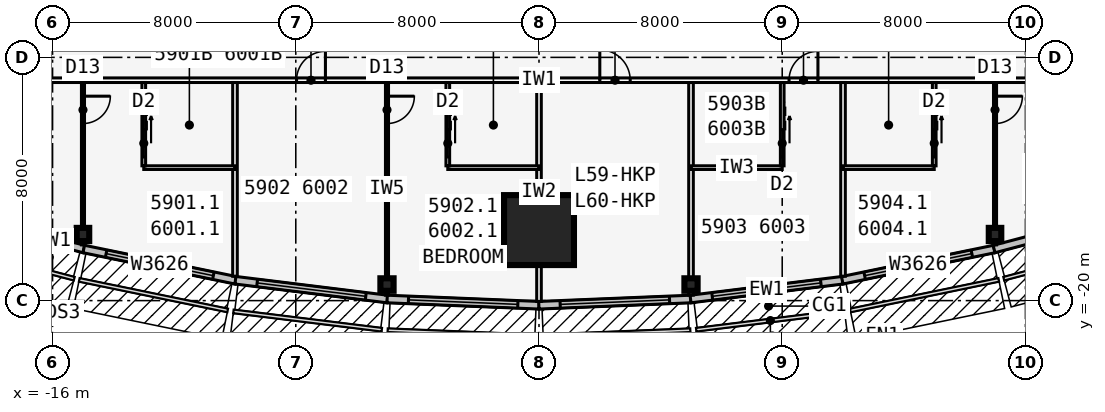
"""IFC4 building model, lengths in metres.
Left out: names, types, materials, properties, quantities, classifications, styles, units other than length and angle.
Written with IfcOpenShell. Run it as: python <this file> out.ifc"""

import sys

from ifc_helpers import new_model, si_unit, direction, frame, frame_2d, origin, origin_2d, place, context, subcontext, project, spatial, rectangle, i_section, extrude, element, fill, save


model = new_model("IFC4")
c1 = context("Model", 3, precision=1e-05, world=origin(), true_north=direction((0.0, 1.0)))
c2 = subcontext(c1, "Body", "Model", "MODEL_VIEW")
j1 = project(units=[si_unit("LENGTHUNIT", "METRE"), si_unit("PLANEANGLEUNIT", "RADIAN")], contexts=[c1])
p1 = place(None, origin())
s1 = spatial("IfcSite", under=j1, at=p1, CompositionType="ELEMENT")
p2 = place(p1, origin())
s2 = spatial("IfcBuilding", under=s1, at=p2, CompositionType="ELEMENT")
p3 = place(p2, frame((0.0, 0.0, 222.5)))
s3 = spatial("IfcBuildingStorey", under=s2, at=p3, CompositionType="ELEMENT", Elevation=222.5)
for number, where, z_axis, x_axis in (
    (1, (-15.0, -17.825, 0.0), (0.0, 0.0, 1.0), (1.0, 0.0, 0.0)),
    (2, (-5.0, -19.472, 0.0), (0.0, 0.0, 1.0), (0.0, -1.0, 0.0)),
    (3, (5.0, -19.472, 0.0), (0.0, 0.0, 1.0), (0.0, -1.0, 0.0)),
    (4, (15.0, -17.825, 0.0), (0.0, 0.0, 1.0), (1.0, 0.0, 0.0)),
):
    element("IfcColumn", number, at=place(p3, frame(where, z_axis=z_axis, x_axis=x_axis)), inside=s3, PredefinedType="COLUMN", context=c2, shape_type="SweptSolid", body=[
        extrude(i_section(OverallWidth=0.411, OverallDepth=0.434, WebThickness=0.036, FlangeThickness=0.057, at=origin_2d()), origin(), (0.0, 0.0, 1.0), 3.6),
    ])
p4 = place(p3, frame((0.0, -17.68, 0.0), z_axis=(0.0, 0.0, 1.0), x_axis=(0.0, -1.0, 0.0)))
e5 = element("IfcColumn", 5, at=p4, inside=s3, PredefinedType="COLUMN", context=c2, shape_type="SweptSolid", body=[
    extrude(rectangle(XDim=2.3, YDim=2.3, at=origin_2d()), origin(), (0.0, 0.0, 1.0), 3.6),
])
p5 = place(p3, frame((-16.968, -17.777, 0.0), z_axis=(0.0, 0.0, 1.0), x_axis=(0.967010286052, -0.254737328772, 0.0)))
e6 = element("IfcWall", 6, at=p5, inside=s3, PredefinedType="STANDARD", context=c2, shape_type="SweptSolid", body=[
    extrude(rectangle(XDim=2.068, YDim=0.25, at=frame_2d((1.034, 0.0))), origin(), (0.0, 0.0, 1.0), 3.435),
])
p6 = place(p3, frame((-14.975, -18.302, 0.0), z_axis=(0.0, 0.0, 1.0), x_axis=(0.979461488189, -0.201631329795, 0.0)))
e7 = element("IfcWall", 7, at=p6, inside=s3, PredefinedType="STANDARD", context=c2, shape_type="SweptSolid", body=[
    extrude(rectangle(XDim=5.105, YDim=0.25, at=frame_2d((2.552, 0.0))), origin(), (0.0, 0.0, 1.0), 3.435),
])
p7 = place(p6, frame((0.752, 0.0, 0.45)))
e8 = element("IfcOpeningElement", 8, at=p7, cuts=e7, PredefinedType="OPENING", context=c2, shape_type="SweptSolid", body=[
    extrude(rectangle(XDim=3.6, YDim=2.6, at=frame_2d((1.8, 1.3))), frame((0.0, 0.135, 0.0), z_axis=(0.0, -1.0, 0.0), x_axis=(1.0, 0.0, 0.0)), (0.0, 0.0, 1.0), 0.27),
])
p8 = place(p3, frame((-9.985, -19.33, 0.0), z_axis=(0.0, 0.0, 1.0), x_axis=(0.992449874964, -0.12265090984, 0.0)))
e9 = element("IfcWall", 9, at=p8, inside=s3, PredefinedType="STANDARD", context=c2, shape_type="SweptSolid", body=[
    extrude(rectangle(XDim=5.038, YDim=0.25, at=frame_2d((2.519, 0.0))), origin(), (0.0, 0.0, 1.0), 3.435),
])
p9 = place(p8, frame((0.719, 0.0, 0.45)))
e10 = element("IfcOpeningElement", 10, at=p9, cuts=e9, PredefinedType="OPENING", context=c2, shape_type="SweptSolid", body=[
    extrude(rectangle(XDim=3.6, YDim=2.6, at=frame_2d((1.8, 1.3))), frame((0.0, 0.135, 0.0), z_axis=(0.0, -1.0, 0.0), x_axis=(1.0, 0.0, 0.0)), (0.0, 0.0, 1.0), 0.27),
])
p10 = place(p3, frame((-4.995, -19.947, 0.0), z_axis=(0.0, 0.0, 1.0), x_axis=(0.999151909423, -0.041175986892, 0.0)))
e11 = element("IfcWall", 11, at=p10, inside=s3, PredefinedType="STANDARD", context=c2, shape_type="SweptSolid", body=[
    extrude(rectangle(XDim=5.004, YDim=0.25, at=frame_2d((2.502, 0.0))), origin(), (0.0, 0.0, 1.0), 3.435),
])
p11 = place(p10, frame((0.702, 0.0, 0.45)))
e12 = element("IfcOpeningElement", 12, at=p11, cuts=e11, PredefinedType="OPENING", context=c2, shape_type="SweptSolid", body=[
    extrude(rectangle(XDim=3.6, YDim=2.6, at=frame_2d((1.8, 1.3))), frame((0.0, 0.135, 0.0), z_axis=(0.0, -1.0, 0.0), x_axis=(1.0, 0.0, 0.0)), (0.0, 0.0, 1.0), 0.27),
])
p12 = place(p3, frame((-0.005, -20.153, 0.0), z_axis=(0.0, 0.0, 1.0), x_axis=(0.999151909423, 0.041175986892, 0.0)))
e13 = element("IfcWall", 13, at=p12, inside=s3, PredefinedType="STANDARD", context=c2, shape_type="SweptSolid", body=[
    extrude(rectangle(XDim=5.004, YDim=0.25, at=frame_2d((2.502, 0.0))), origin(), (0.0, 0.0, 1.0), 3.435),
])
p13 = place(p12, frame((0.702, 0.0, 0.45)))
e14 = element("IfcOpeningElement", 14, at=p13, cuts=e13, PredefinedType="OPENING", context=c2, shape_type="SweptSolid", body=[
    extrude(rectangle(XDim=3.6, YDim=2.6, at=frame_2d((1.8, 1.3))), frame((0.0, 0.135, 0.0), z_axis=(0.0, -1.0, 0.0), x_axis=(1.0, 0.0, 0.0)), (0.0, 0.0, 1.0), 0.27),
])
p14 = place(p3, frame((4.985, -19.948, 0.0), z_axis=(0.0, 0.0, 1.0), x_axis=(0.992449874964, 0.12265090984, 0.0)))
e15 = element("IfcWall", 15, at=p14, inside=s3, PredefinedType="STANDARD", context=c2, shape_type="SweptSolid", body=[
    extrude(rectangle(XDim=5.038, YDim=0.25, at=frame_2d((2.519, 0.0))), origin(), (0.0, 0.0, 1.0), 3.435),
])
p15 = place(p14, frame((0.719, 0.0, 0.45)))
e16 = element("IfcOpeningElement", 16, at=p15, cuts=e15, PredefinedType="OPENING", context=c2, shape_type="SweptSolid", body=[
    extrude(rectangle(XDim=3.6, YDim=2.6, at=frame_2d((1.8, 1.3))), frame((0.0, 0.135, 0.0), z_axis=(0.0, -1.0, 0.0), x_axis=(1.0, 0.0, 0.0)), (0.0, 0.0, 1.0), 0.27),
])
p16 = place(p3, frame((9.975, -19.332, 0.0), z_axis=(0.0, 0.0, 1.0), x_axis=(0.979461488189, 0.201631329795, 0.0)))
e17 = element("IfcWall", 17, at=p16, inside=s3, PredefinedType="STANDARD", context=c2, shape_type="SweptSolid", body=[
    extrude(rectangle(XDim=5.105, YDim=0.25, at=frame_2d((2.552, 0.0))), origin(), (0.0, 0.0, 1.0), 3.435),
])
p17 = place(p16, frame((0.752, 0.0, 0.45)))
e18 = element("IfcOpeningElement", 18, at=p17, cuts=e17, PredefinedType="OPENING", context=c2, shape_type="SweptSolid", body=[
    extrude(rectangle(XDim=3.6, YDim=2.6, at=frame_2d((1.8, 1.3))), frame((0.0, 0.135, 0.0), z_axis=(0.0, -1.0, 0.0), x_axis=(1.0, 0.0, 0.0)), (0.0, 0.0, 1.0), 0.27),
])
p18 = place(p3, frame((14.968, -18.304, 0.0), z_axis=(0.0, 0.0, 1.0), x_axis=(0.967010286052, 0.254737328772, 0.0)))
e19 = element("IfcWall", 19, at=p18, inside=s3, PredefinedType="STANDARD", context=c2, shape_type="SweptSolid", body=[
    extrude(rectangle(XDim=2.068, YDim=0.25, at=frame_2d((1.034, 0.0))), origin(), (0.0, 0.0, 1.0), 3.435),
])
p19 = place(p3, frame((-21.236, -12.751, 0.0), z_axis=(0.0, 0.0, 1.0), x_axis=(1.0, 0.0, 0.0)))
e20 = element("IfcWall", 20, at=p19, inside=s3, PredefinedType="PARTITIONING", context=c2, shape_type="SweptSolid", body=[
    extrude(rectangle(XDim=42.472, YDim=0.15, at=frame_2d((21.236, 0.0))), origin(), (0.0, 0.0, 1.0), 3.435),
])
p20 = place(p19, frame((2.444, 0.0, 0.0)))
e21 = element("IfcOpeningElement", 21, at=p20, cuts=e20, PredefinedType="OPENING", context=c2, shape_type="SweptSolid", body=[
    extrude(rectangle(XDim=0.95, YDim=2.13, at=frame_2d((0.475, 1.065))), frame((0.0, 0.085, 0.0), z_axis=(0.0, -1.0, 0.0), x_axis=(1.0, 0.0, 0.0)), (0.0, 0.0, 1.0), 0.17),
])
p21 = place(p19, frame((13.261, 0.0, 0.0)))
e22 = element("IfcOpeningElement", 22, at=p21, cuts=e20, PredefinedType="OPENING", context=c2, shape_type="SweptSolid", body=[
    extrude(rectangle(XDim=0.95, YDim=2.13, at=frame_2d((0.475, 1.065))), frame((0.0, 0.085, 0.0), z_axis=(0.0, -1.0, 0.0), x_axis=(1.0, 0.0, 0.0)), (0.0, 0.0, 1.0), 0.17),
])
p22 = place(p19, frame((23.236, 0.0, 0.0)))
e23 = element("IfcOpeningElement", 23, at=p22, cuts=e20, PredefinedType="OPENING", context=c2, shape_type="SweptSolid", body=[
    extrude(rectangle(XDim=1.0, YDim=2.13, at=frame_2d((0.5, 1.065))), frame((0.0, 0.085, 0.0), z_axis=(0.0, -1.0, 0.0), x_axis=(1.0, 0.0, 0.0)), (0.0, 0.0, 1.0), 0.17),
])
p23 = place(p19, frame((29.461, 0.0, 0.0)))
e24 = element("IfcOpeningElement", 24, at=p23, cuts=e20, PredefinedType="OPENING", context=c2, shape_type="SweptSolid", body=[
    extrude(rectangle(XDim=0.95, YDim=2.13, at=frame_2d((0.475, 1.065))), frame((0.0, 0.085, 0.0), z_axis=(0.0, -1.0, 0.0), x_axis=(1.0, 0.0, 0.0)), (0.0, 0.0, 1.0), 0.17),
])
p24 = place(p19, frame((39.077, 0.0, 0.0)))
e25 = element("IfcOpeningElement", 25, at=p24, cuts=e20, PredefinedType="OPENING", context=c2, shape_type="SweptSolid", body=[
    extrude(rectangle(XDim=0.95, YDim=2.13, at=frame_2d((0.475, 1.065))), frame((0.0, 0.085, 0.0), z_axis=(0.0, -1.0, 0.0), x_axis=(1.0, 0.0, 0.0)), (0.0, 0.0, 1.0), 0.17),
])
p25 = place(p3, frame((-15.0, -12.826, 0.0), z_axis=(0.0, 0.0, 1.0), x_axis=(0.0, -1.0, 0.0)))
e26 = element("IfcWall", 26, at=p25, inside=s3, PredefinedType="PARTITIONING", context=c2, shape_type="SweptSolid", body=[
    extrude(rectangle(XDim=5.34, YDim=0.1, at=frame_2d((2.67, 0.0))), origin(), (0.0, 0.0, 1.0), 2.589),
])
p26 = place(p25, frame((0.45, 0.0, 0.0)))
e27 = element("IfcOpeningElement", 27, at=p26, cuts=e26, PredefinedType="OPENING", context=c2, shape_type="SweptSolid", body=[
    extrude(rectangle(XDim=0.9, YDim=2.13, at=frame_2d((0.45, 1.065))), frame((0.0, 0.06, 0.0), z_axis=(0.0, -1.0, 0.0), x_axis=(1.0, 0.0, 0.0)), (0.0, 0.0, 1.0), 0.12),
])
p27 = place(p3, frame((-10.0, -12.826, 0.0), z_axis=(0.0, 0.0, 1.0), x_axis=(0.0, -1.0, 0.0)))
e28 = element("IfcWall", 28, at=p27, inside=s3, PredefinedType="PARTITIONING", context=c2, shape_type="SweptSolid", body=[
    extrude(rectangle(XDim=6.373, YDim=0.15, at=frame_2d((3.187, 0.0))), origin(), (0.0, 0.0, 1.0), 2.589),
])
p28 = place(p3, frame((-5.0, -12.826, 0.0), z_axis=(0.0, 0.0, 1.0), x_axis=(0.0, -1.0, 0.0)))
e29 = element("IfcWall", 29, at=p28, inside=s3, PredefinedType="PARTITIONING", context=c2, shape_type="SweptSolid", body=[
    extrude(rectangle(XDim=6.994, YDim=0.1, at=frame_2d((3.497, 0.0))), origin(), (0.0, 0.0, 1.0), 2.589),
])
p29 = place(p28, frame((0.45, 0.0, 0.0)))
e30 = element("IfcOpeningElement", 30, at=p29, cuts=e29, PredefinedType="OPENING", context=c2, shape_type="SweptSolid", body=[
    extrude(rectangle(XDim=0.9, YDim=2.13, at=frame_2d((0.45, 1.065))), frame((0.0, 0.06, 0.0), z_axis=(0.0, -1.0, 0.0), x_axis=(1.0, 0.0, 0.0)), (0.0, 0.0, 1.0), 0.12),
])
p30 = place(p3, frame((0.0, -12.826, 0.0), z_axis=(0.0, 0.0, 1.0), x_axis=(0.0, -1.0, 0.0)))
e31 = element("IfcWall", 31, at=p30, inside=s3, PredefinedType="PARTITIONING", context=c2, shape_type="SweptSolid", body=[
    extrude(rectangle(XDim=7.201, YDim=0.15, at=frame_2d((3.601, 0.0))), origin(), (0.0, 0.0, 1.0), 2.589),
])
p31 = place(p3, frame((5.0, -12.826, 0.0), z_axis=(0.0, 0.0, 1.0), x_axis=(0.0, -1.0, 0.0)))
e32 = element("IfcWall", 32, at=p31, inside=s3, PredefinedType="PARTITIONING", context=c2, shape_type="SweptSolid", body=[
    extrude(rectangle(XDim=6.994, YDim=0.15, at=frame_2d((3.497, 0.0))), origin(), (0.0, 0.0, 1.0), 2.589),
])
p32 = place(p3, frame((10.0, -12.826, 0.0), z_axis=(0.0, 0.0, 1.0), x_axis=(0.0, -1.0, 0.0)))
e33 = element("IfcWall", 33, at=p32, inside=s3, PredefinedType="PARTITIONING", context=c2, shape_type="SweptSolid", body=[
    extrude(rectangle(XDim=6.373, YDim=0.15, at=frame_2d((3.187, 0.0))), origin(), (0.0, 0.0, 1.0), 2.589),
])
p33 = place(p3, frame((15.0, -12.826, 0.0), z_axis=(0.0, 0.0, 1.0), x_axis=(0.0, -1.0, 0.0)))
e34 = element("IfcWall", 34, at=p33, inside=s3, PredefinedType="PARTITIONING", context=c2, shape_type="SweptSolid", body=[
    extrude(rectangle(XDim=5.34, YDim=0.1, at=frame_2d((2.67, 0.0))), origin(), (0.0, 0.0, 1.0), 2.589),
])
p34 = place(p33, frame((0.45, 0.0, 0.0)))
e35 = element("IfcOpeningElement", 35, at=p34, cuts=e34, PredefinedType="OPENING", context=c2, shape_type="SweptSolid", body=[
    extrude(rectangle(XDim=0.9, YDim=2.13, at=frame_2d((0.45, 1.065))), frame((0.0, 0.06, 0.0), z_axis=(0.0, -1.0, 0.0), x_axis=(1.0, 0.0, 0.0)), (0.0, 0.0, 1.0), 0.12),
])
p35 = place(p3, frame((-13.0, -15.626, 0.0), z_axis=(0.0, 0.0, 1.0), x_axis=(1.0, 0.0, 0.0)))
e36 = element("IfcWall", 36, at=p35, inside=s3, PredefinedType="PLUMBINGWALL", context=c2, shape_type="SweptSolid", body=[
    extrude(rectangle(XDim=3.0, YDim=0.12, at=frame_2d((1.5, 0.0))), origin(), (0.0, 0.0, 1.0), 3.435),
])
p36 = place(p3, frame((-13.0, -12.826, 0.0), z_axis=(0.0, 0.0, 1.0), x_axis=(0.0, -1.0, 0.0)))
e37 = element("IfcWall", 37, at=p36, inside=s3, PredefinedType="PLUMBINGWALL", context=c2, shape_type="SweptSolid", body=[
    extrude(rectangle(XDim=2.74, YDim=0.12, at=frame_2d((1.37, 0.0))), origin(), (0.0, 0.0, 1.0), 3.435),
])
p37 = place(p36, frame((1.55, 0.0, 0.0)))
e38 = element("IfcOpeningElement", 38, at=p37, cuts=e37, PredefinedType="OPENING", context=c2, shape_type="SweptSolid", body=[
    extrude(rectangle(XDim=0.9, YDim=2.13, at=frame_2d((0.45, 1.065))), frame((0.0, 0.07, 0.0), z_axis=(0.0, -1.0, 0.0), x_axis=(1.0, 0.0, 0.0)), (0.0, 0.0, 1.0), 0.14),
])
p38 = place(p3, frame((-3.0, -15.626, 0.0), z_axis=(0.0, 0.0, 1.0), x_axis=(1.0, 0.0, 0.0)))
e39 = element("IfcWall", 39, at=p38, inside=s3, PredefinedType="PLUMBINGWALL", context=c2, shape_type="SweptSolid", body=[
    extrude(rectangle(XDim=3.0, YDim=0.12, at=frame_2d((1.5, 0.0))), origin(), (0.0, 0.0, 1.0), 3.435),
])
p39 = place(p3, frame((-3.0, -12.826, 0.0), z_axis=(0.0, 0.0, 1.0), x_axis=(0.0, -1.0, 0.0)))
e40 = element("IfcWall", 40, at=p39, inside=s3, PredefinedType="PLUMBINGWALL", context=c2, shape_type="SweptSolid", body=[
    extrude(rectangle(XDim=2.74, YDim=0.12, at=frame_2d((1.37, 0.0))), origin(), (0.0, 0.0, 1.0), 3.435),
])
p40 = place(p39, frame((1.55, 0.0, 0.0)))
e41 = element("IfcOpeningElement", 41, at=p40, cuts=e40, PredefinedType="OPENING", context=c2, shape_type="SweptSolid", body=[
    extrude(rectangle(XDim=0.9, YDim=2.13, at=frame_2d((0.45, 1.065))), frame((0.0, 0.07, 0.0), z_axis=(0.0, -1.0, 0.0), x_axis=(1.0, 0.0, 0.0)), (0.0, 0.0, 1.0), 0.14),
])
p41 = place(p3, frame((5.0, -15.626, 0.0), z_axis=(0.0, 0.0, 1.0), x_axis=(1.0, 0.0, 0.0)))
e42 = element("IfcWall", 42, at=p41, inside=s3, PredefinedType="PLUMBINGWALL", context=c2, shape_type="SweptSolid", body=[
    extrude(rectangle(XDim=3.0, YDim=0.12, at=frame_2d((1.5, 0.0))), origin(), (0.0, 0.0, 1.0), 3.435),
])
p42 = place(p3, frame((8.0, -12.826, 0.0), z_axis=(0.0, 0.0, 1.0), x_axis=(0.0, -1.0, 0.0)))
e43 = element("IfcWall", 43, at=p42, inside=s3, PredefinedType="PLUMBINGWALL", context=c2, shape_type="SweptSolid", body=[
    extrude(rectangle(XDim=2.74, YDim=0.12, at=frame_2d((1.37, 0.0))), origin(), (0.0, 0.0, 1.0), 3.435),
])
p43 = place(p42, frame((1.55, 0.0, 0.0)))
e44 = element("IfcOpeningElement", 44, at=p43, cuts=e43, PredefinedType="OPENING", context=c2, shape_type="SweptSolid", body=[
    extrude(rectangle(XDim=0.9, YDim=2.13, at=frame_2d((0.45, 1.065))), frame((0.0, 0.07, 0.0), z_axis=(0.0, -1.0, 0.0), x_axis=(1.0, 0.0, 0.0)), (0.0, 0.0, 1.0), 0.14),
])
p44 = place(p3, frame((10.0, -15.626, 0.0), z_axis=(0.0, 0.0, 1.0), x_axis=(1.0, 0.0, 0.0)))
e45 = element("IfcWall", 45, at=p44, inside=s3, PredefinedType="PLUMBINGWALL", context=c2, shape_type="SweptSolid", body=[
    extrude(rectangle(XDim=3.0, YDim=0.12, at=frame_2d((1.5, 0.0))), origin(), (0.0, 0.0, 1.0), 3.435),
])
p45 = place(p3, frame((13.0, -12.826, 0.0), z_axis=(0.0, 0.0, 1.0), x_axis=(0.0, -1.0, 0.0)))
e46 = element("IfcWall", 46, at=p45, inside=s3, PredefinedType="PLUMBINGWALL", context=c2, shape_type="SweptSolid", body=[
    extrude(rectangle(XDim=2.74, YDim=0.12, at=frame_2d((1.37, 0.0))), origin(), (0.0, 0.0, 1.0), 3.435),
])
p46 = place(p45, frame((1.55, 0.0, 0.0)))
e47 = element("IfcOpeningElement", 47, at=p46, cuts=e46, PredefinedType="OPENING", context=c2, shape_type="SweptSolid", body=[
    extrude(rectangle(XDim=0.9, YDim=2.13, at=frame_2d((0.45, 1.065))), frame((0.0, 0.07, 0.0), z_axis=(0.0, -1.0, 0.0), x_axis=(1.0, 0.0, 0.0)), (0.0, 0.0, 1.0), 0.14),
])
p47 = place(p7, origin())
e48 = element("IfcWindow", 48, at=p47, inside=s3, PartitioningType="SINGLE_PANEL", PredefinedType="WINDOW", context=c2, shape_type="SweptSolid", body=[
    extrude(rectangle(XDim=3.6, YDim=2.6, at=frame_2d((1.8, 1.3))), frame((0.0, 0.03, 0.0), z_axis=(0.0, -1.0, 0.0), x_axis=(1.0, 0.0, 0.0)), (0.0, 0.0, 1.0), 0.06),
])
fill(e8, e48)
p48 = place(p9, origin())
e49 = element("IfcWindow", 49, at=p48, inside=s3, PartitioningType="SINGLE_PANEL", PredefinedType="WINDOW", context=c2, shape_type="SweptSolid", body=[
    extrude(rectangle(XDim=3.6, YDim=2.6, at=frame_2d((1.8, 1.3))), frame((0.0, 0.03, 0.0), z_axis=(0.0, -1.0, 0.0), x_axis=(1.0, 0.0, 0.0)), (0.0, 0.0, 1.0), 0.06),
])
fill(e10, e49)
p49 = place(p11, origin())
e50 = element("IfcWindow", 50, at=p49, inside=s3, PartitioningType="SINGLE_PANEL", PredefinedType="WINDOW", context=c2, shape_type="SweptSolid", body=[
    extrude(rectangle(XDim=3.6, YDim=2.6, at=frame_2d((1.8, 1.3))), frame((0.0, 0.03, 0.0), z_axis=(0.0, -1.0, 0.0), x_axis=(1.0, 0.0, 0.0)), (0.0, 0.0, 1.0), 0.06),
])
fill(e12, e50)
p50 = place(p13, origin())
e51 = element("IfcWindow", 51, at=p50, inside=s3, PartitioningType="SINGLE_PANEL", PredefinedType="WINDOW", context=c2, shape_type="SweptSolid", body=[
    extrude(rectangle(XDim=3.6, YDim=2.6, at=frame_2d((1.8, 1.3))), frame((0.0, 0.03, 0.0), z_axis=(0.0, -1.0, 0.0), x_axis=(1.0, 0.0, 0.0)), (0.0, 0.0, 1.0), 0.06),
])
fill(e14, e51)
p51 = place(p15, origin())
e52 = element("IfcWindow", 52, at=p51, inside=s3, PartitioningType="SINGLE_PANEL", PredefinedType="WINDOW", context=c2, shape_type="SweptSolid", body=[
    extrude(rectangle(XDim=3.6, YDim=2.6, at=frame_2d((1.8, 1.3))), frame((0.0, 0.03, 0.0), z_axis=(0.0, -1.0, 0.0), x_axis=(1.0, 0.0, 0.0)), (0.0, 0.0, 1.0), 0.06),
])
fill(e16, e52)
p52 = place(p17, origin())
e53 = element("IfcWindow", 53, at=p52, inside=s3, PartitioningType="SINGLE_PANEL", PredefinedType="WINDOW", context=c2, shape_type="SweptSolid", body=[
    extrude(rectangle(XDim=3.6, YDim=2.6, at=frame_2d((1.8, 1.3))), frame((0.0, 0.03, 0.0), z_axis=(0.0, -1.0, 0.0), x_axis=(1.0, 0.0, 0.0)), (0.0, 0.0, 1.0), 0.06),
])
fill(e18, e53)
p53 = place(p26, origin())
e54 = element("IfcDoor", 54, at=p53, inside=s3, OperationType="SINGLE_SWING_LEFT", PredefinedType="DOOR", context=c2, shape_type="SweptSolid", body=[
    extrude(rectangle(XDim=0.9, YDim=2.13, at=frame_2d((0.45, 1.065))), frame((0.0, 0.025, 0.0), z_axis=(0.0, -1.0, 0.0), x_axis=(1.0, 0.0, 0.0)), (0.0, 0.0, 1.0), 0.05),
])
fill(e27, e54)
p54 = place(p29, origin())
e55 = element("IfcDoor", 55, at=p54, inside=s3, OperationType="SINGLE_SWING_LEFT", PredefinedType="DOOR", context=c2, shape_type="SweptSolid", body=[
    extrude(rectangle(XDim=0.9, YDim=2.13, at=frame_2d((0.45, 1.065))), frame((0.0, 0.025, 0.0), z_axis=(0.0, -1.0, 0.0), x_axis=(1.0, 0.0, 0.0)), (0.0, 0.0, 1.0), 0.05),
])
fill(e30, e55)
p55 = place(p34, origin())
e56 = element("IfcDoor", 56, at=p55, inside=s3, OperationType="SINGLE_SWING_LEFT", PredefinedType="DOOR", context=c2, shape_type="SweptSolid", body=[
    extrude(rectangle(XDim=0.9, YDim=2.13, at=frame_2d((0.45, 1.065))), frame((0.0, 0.025, 0.0), z_axis=(0.0, -1.0, 0.0), x_axis=(1.0, 0.0, 0.0)), (0.0, 0.0, 1.0), 0.05),
])
fill(e35, e56)
p56 = place(p37, origin())
e57 = element("IfcDoor", 57, at=p56, inside=s3, OperationType="SLIDING_TO_LEFT", PredefinedType="DOOR", context=c2, shape_type="SweptSolid", body=[
    extrude(rectangle(XDim=0.9, YDim=2.13, at=frame_2d((0.45, 1.065))), frame((0.0, 0.025, 0.0), z_axis=(0.0, -1.0, 0.0), x_axis=(1.0, 0.0, 0.0)), (0.0, 0.0, 1.0), 0.05),
])
fill(e38, e57)
p57 = place(p21, origin())
e58 = element("IfcDoor", 58, at=p57, inside=s3, OperationType="SINGLE_SWING_RIGHT", PredefinedType="DOOR", context=c2, shape_type="SweptSolid", body=[
    extrude(rectangle(XDim=0.95, YDim=2.13, at=frame_2d((0.475, 1.065))), frame((0.0, 0.025, 0.0), z_axis=(0.0, -1.0, 0.0), x_axis=(1.0, 0.0, 0.0)), (0.0, 0.0, 1.0), 0.05),
])
fill(e22, e58)
p58 = place(p40, origin())
e59 = element("IfcDoor", 59, at=p58, inside=s3, OperationType="SLIDING_TO_LEFT", PredefinedType="DOOR", context=c2, shape_type="SweptSolid", body=[
    extrude(rectangle(XDim=0.9, YDim=2.13, at=frame_2d((0.45, 1.065))), frame((0.0, 0.025, 0.0), z_axis=(0.0, -1.0, 0.0), x_axis=(1.0, 0.0, 0.0)), (0.0, 0.0, 1.0), 0.05),
])
fill(e41, e59)
p59 = place(p22, origin())
e60 = element("IfcDoor", 60, at=p59, inside=s3, OperationType="SINGLE_SWING_LEFT", PredefinedType="DOOR", context=c2, shape_type="SweptSolid", body=[
    extrude(rectangle(XDim=1.0, YDim=2.13, at=frame_2d((0.5, 1.065))), frame((0.0, 0.025, 0.0), z_axis=(0.0, -1.0, 0.0), x_axis=(1.0, 0.0, 0.0)), (0.0, 0.0, 1.0), 0.05),
])
fill(e23, e60)
p60 = place(p43, origin())
e61 = element("IfcDoor", 61, at=p60, inside=s3, OperationType="SLIDING_TO_LEFT", PredefinedType="DOOR", context=c2, shape_type="SweptSolid", body=[
    extrude(rectangle(XDim=0.9, YDim=2.13, at=frame_2d((0.45, 1.065))), frame((0.0, 0.025, 0.0), z_axis=(0.0, -1.0, 0.0), x_axis=(1.0, 0.0, 0.0)), (0.0, 0.0, 1.0), 0.05),
])
fill(e44, e61)
p61 = place(p23, origin())
e62 = element("IfcDoor", 62, at=p61, inside=s3, OperationType="SINGLE_SWING_RIGHT", PredefinedType="DOOR", context=c2, shape_type="SweptSolid", body=[
    extrude(rectangle(XDim=0.95, YDim=2.13, at=frame_2d((0.475, 1.065))), frame((0.0, 0.025, 0.0), z_axis=(0.0, -1.0, 0.0), x_axis=(1.0, 0.0, 0.0)), (0.0, 0.0, 1.0), 0.05),
])
fill(e24, e62)
p62 = place(p46, origin())
e63 = element("IfcDoor", 63, at=p62, inside=s3, OperationType="SLIDING_TO_LEFT", PredefinedType="DOOR", context=c2, shape_type="SweptSolid", body=[
    extrude(rectangle(XDim=0.9, YDim=2.13, at=frame_2d((0.45, 1.065))), frame((0.0, 0.025, 0.0), z_axis=(0.0, -1.0, 0.0), x_axis=(1.0, 0.0, 0.0)), (0.0, 0.0, 1.0), 0.05),
])
fill(e47, e63)
save(model, sys.argv[1])
